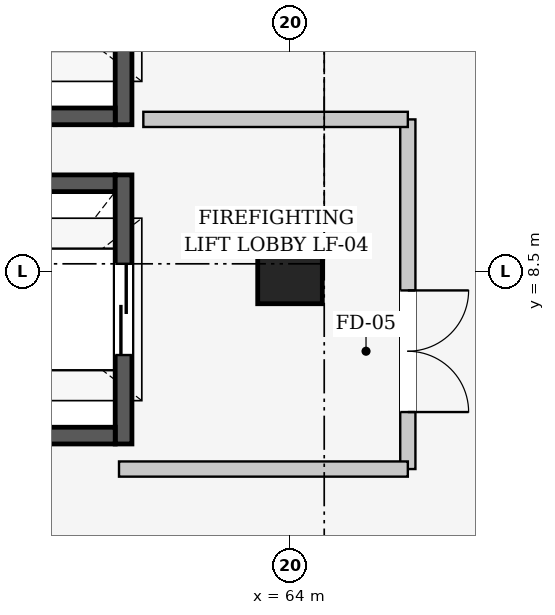
"""IFC4 building model, lengths in metres.
Left out: names, types, materials, properties, quantities, classifications, styles, units other than length and angle.
Written with IfcOpenShell. Run it as: python <this file> out.ifc"""

import sys

from ifc_helpers import new_model, si_unit, direction, frame, frame_2d, origin, origin_2d, place, context, subcontext, project, spatial, rectangle, extrude, element, fill, save


model = new_model("IFC4")
c1 = context("Model", 3, precision=1e-05, world=origin(), true_north=direction((0.0, 1.0)))
c2 = subcontext(c1, "Body", "Model", "MODEL_VIEW")
j1 = project(units=[si_unit("LENGTHUNIT", "METRE"), si_unit("PLANEANGLEUNIT", "RADIAN")], contexts=[c1])
p1 = place(None, origin())
s1 = spatial("IfcSite", under=j1, at=p1, CompositionType="ELEMENT")
p2 = place(p1, origin())
s2 = spatial("IfcBuilding", under=s1, at=p2, CompositionType="ELEMENT")
p3 = place(p2, frame((0.0, 0.0, 11.4)))
s3 = spatial("IfcBuildingStorey", under=s2, at=p3, CompositionType="ELEMENT", Elevation=11.4)
p4 = place(p3, frame((64.0, 8.5, 0.0), z_axis=(0.0, 0.0, 1.0), x_axis=(1.0, 0.0, 0.0)))
e1 = element("IfcColumn", 1, at=p4, inside=s3, PredefinedType="COLUMN", context=c2, shape_type="SweptSolid", body=[
    extrude(rectangle(XDim=0.85, YDim=0.85, at=origin_2d()), origin(), (0.0, 0.0, 1.0), 4.8),
])
p5 = place(p3, frame((59.3, 9.66, 0.0), z_axis=(0.0, 0.0, 1.0), x_axis=(1.0, 0.0, 0.0)))
e2 = element("IfcWall", 2, at=p5, inside=s3, PredefinedType="SHEAR", context=c2, shape_type="SweptSolid", body=[
    extrude(rectangle(XDim=2.4, YDim=0.22, at=frame_2d((1.2, 0.0))), origin(), (0.0, 0.0, 1.0), 4.8),
])
p6 = place(p3, frame((61.81, 9.77, 0.0), z_axis=(0.0, 0.0, 1.0), x_axis=(0.0, -1.0, 0.0)))
e3 = element("IfcWall", 3, at=p6, inside=s3, PredefinedType="SHEAR", context=c2, shape_type="SweptSolid", body=[
    extrude(rectangle(XDim=3.54, YDim=0.22, at=frame_2d((1.77, 0.0))), origin(), (0.0, 0.0, 1.0), 4.8),
])
p7 = place(p6, frame((1.17, 0.0, 0.0)))
e4 = element("IfcOpeningElement", 4, at=p7, cuts=e3, PredefinedType="OPENING", context=c2, shape_type="SweptSolid", body=[
    extrude(rectangle(XDim=1.2, YDim=2.2, at=frame_2d((0.6, 1.1))), frame((0.0, 0.12, 0.0), z_axis=(0.0, -1.0, 0.0), x_axis=(1.0, 0.0, 0.0)), (0.0, 0.0, 1.0), 0.24),
])
p8 = place(p3, frame((61.7, 6.34, 0.0), z_axis=(0.0, 0.0, 1.0), x_axis=(-1.0, 0.0, 0.0)))
e5 = element("IfcWall", 5, at=p8, inside=s3, PredefinedType="SHEAR", context=c2, shape_type="SweptSolid", body=[
    extrude(rectangle(XDim=2.4, YDim=0.22, at=frame_2d((1.2, 0.0))), origin(), (0.0, 0.0, 1.0), 4.8),
])
p9 = place(p3, frame((61.81, 13.97, 0.0), z_axis=(0.0, 0.0, 1.0), x_axis=(0.0, -1.0, 0.0)))
e6 = element("IfcWall", 6, at=p9, inside=s3, PredefinedType="SHEAR", context=c2, shape_type="SweptSolid", body=[
    extrude(rectangle(XDim=3.54, YDim=0.22, at=frame_2d((1.77, 0.0))), origin(), (0.0, 0.0, 1.0), 4.8),
])
p10 = place(p9, frame((1.22, 0.0, 0.0)))
e7 = element("IfcOpeningElement", 7, at=p10, cuts=e6, PredefinedType="OPENING", context=c2, shape_type="SweptSolid", body=[
    extrude(rectangle(XDim=1.1, YDim=2.2, at=frame_2d((0.55, 1.1))), frame((0.0, 0.12, 0.0), z_axis=(0.0, -1.0, 0.0), x_axis=(1.0, 0.0, 0.0)), (0.0, 0.0, 1.0), 0.24),
])
p11 = place(p3, frame((61.7, 10.54, 0.0), z_axis=(0.0, 0.0, 1.0), x_axis=(-1.0, 0.0, 0.0)))
e8 = element("IfcWall", 8, at=p11, inside=s3, PredefinedType="SHEAR", context=c2, shape_type="SweptSolid", body=[
    extrude(rectangle(XDim=2.4, YDim=0.22, at=frame_2d((1.2, 0.0))), origin(), (0.0, 0.0, 1.0), 4.8),
])
p12 = place(p3, frame((65.55, 10.5, 0.0), z_axis=(0.0, 0.0, 1.0), x_axis=(0.0, -1.0, 0.0)))
e9 = element("IfcWall", 9, at=p12, inside=s3, PredefinedType="PARTITIONING", context=c2, shape_type="SweptSolid", body=[
    extrude(rectangle(XDim=4.6, YDim=0.2, at=frame_2d((2.3, 0.0))), origin(), (0.0, 0.0, 1.0), 3.545),
])
p13 = place(p12, frame((2.25, 0.0, 0.0)))
e10 = element("IfcOpeningElement", 10, at=p13, cuts=e9, PredefinedType="OPENING", context=c2, shape_type="SweptSolid", body=[
    extrude(rectangle(XDim=1.6, YDim=2.2, at=frame_2d((0.8, 1.1))), frame((0.0, 0.11, 0.0), z_axis=(0.0, -1.0, 0.0), x_axis=(1.0, 0.0, 0.0)), (0.0, 0.0, 1.0), 0.22),
])
p14 = place(p3, frame((62.07, 10.5, 0.0), z_axis=(0.0, 0.0, 1.0), x_axis=(1.0, 0.0, 0.0)))
e11 = element("IfcWall", 11, at=p14, inside=s3, PredefinedType="PARTITIONING", context=c2, shape_type="SweptSolid", body=[
    extrude(rectangle(XDim=3.48, YDim=0.2, at=frame_2d((1.74, 0.0))), origin(), (0.0, 0.0, 1.0), 3.845),
])
p15 = place(p3, frame((65.55, 5.9, 0.0), z_axis=(0.0, 0.0, 1.0), x_axis=(-1.0, 0.0, 0.0)))
e12 = element("IfcWall", 12, at=p15, inside=s3, PredefinedType="PARTITIONING", context=c2, shape_type="SweptSolid", body=[
    extrude(rectangle(XDim=3.8, YDim=0.2, at=frame_2d((1.9, 0.0))), origin(), (0.0, 0.0, 1.0), 3.845),
])
p16 = place(p7, origin())
e13 = element("IfcDoor", 13, at=p16, inside=s3, OperationType="SLIDING_TO_LEFT", PredefinedType="DOOR", context=c2, shape_type="SweptSolid", body=[
    extrude(rectangle(XDim=1.2, YDim=2.2, at=frame_2d((0.6, 1.1))), frame((0.0, 0.025, 0.0), z_axis=(0.0, -1.0, 0.0), x_axis=(1.0, 0.0, 0.0)), (0.0, 0.0, 1.0), 0.05),
])
fill(e4, e13)
p17 = place(p13, origin())
e14 = element("IfcDoor", 14, at=p17, inside=s3, OperationType="DOUBLE_DOOR_SINGLE_SWING", PredefinedType="DOOR", context=c2, shape_type="SweptSolid", body=[
    extrude(rectangle(XDim=1.6, YDim=2.2, at=frame_2d((0.8, 1.1))), frame((0.0, 0.025, 0.0), z_axis=(0.0, -1.0, 0.0), x_axis=(1.0, 0.0, 0.0)), (0.0, 0.0, 1.0), 0.05),
])
fill(e10, e14)
save(model, sys.argv[1])
